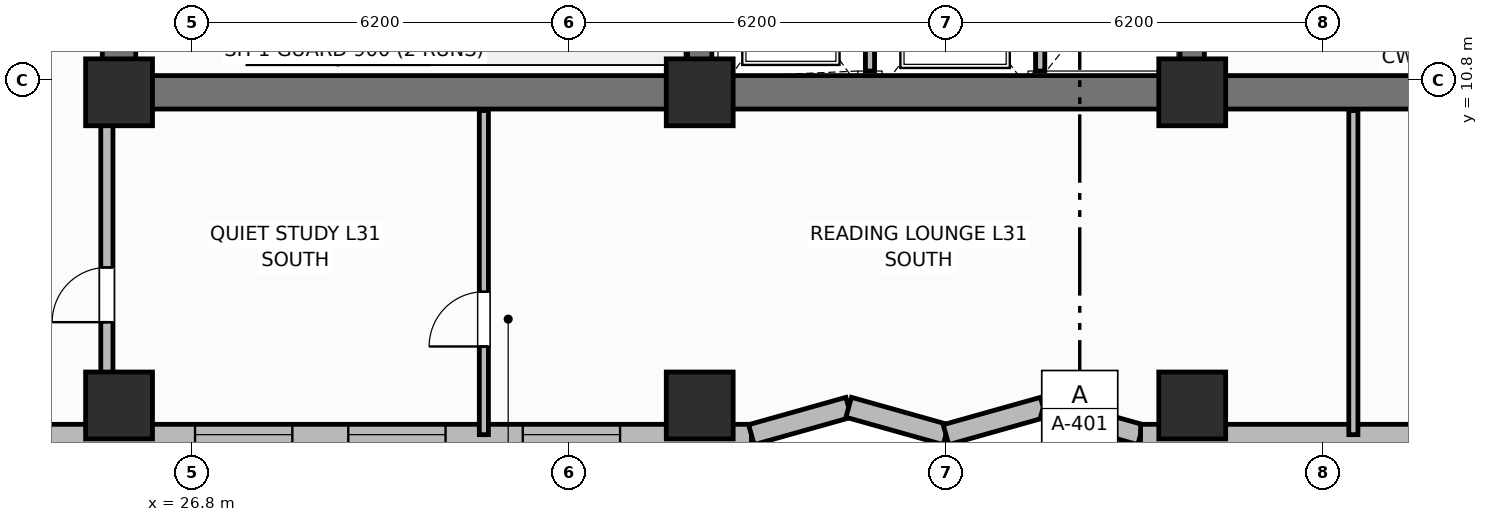
"""IFC4 building model, lengths in metres.
Left out: names, types, materials, properties, quantities, classifications, styles, units other than length and angle.
Written with IfcOpenShell. Run it as: python <this file> out.ifc"""

import sys

from ifc_helpers import new_model, si_unit, direction, frame, frame_2d, origin, origin_2d, place, context, subcontext, project, spatial, rectangle, extrude, element, fill, save


model = new_model("IFC4")
c1 = context("Model", 3, precision=1e-05, world=origin(), true_north=direction((0.0, 1.0)))
c2 = subcontext(c1, "Body", "Model", "MODEL_VIEW")
j1 = project(units=[si_unit("LENGTHUNIT", "METRE"), si_unit("PLANEANGLEUNIT", "RADIAN")], contexts=[c1])
p1 = place(None, origin())
s1 = spatial("IfcSite", under=j1, at=p1, CompositionType="ELEMENT")
p2 = place(p1, origin())
s2 = spatial("IfcBuilding", under=s1, at=p2, CompositionType="ELEMENT")
p3 = place(p2, frame((0.0, 0.0, 125.3)))
s3 = spatial("IfcBuildingStorey", under=s2, at=p3, CompositionType="ELEMENT", Elevation=125.3)
p4 = place(p3, frame((52.8, 10.6, 0.0), z_axis=(0.0, 0.0, 1.0), x_axis=(-1.0, 0.0, 0.0)))
e1 = element("IfcWall", 1, at=p4, inside=s3, PredefinedType="SHEAR", context=c2, shape_type="SweptSolid", body=[
    extrude(rectangle(XDim=27.2, YDim=0.55, at=frame_2d((13.6, 0.0))), origin(), (0.0, 0.0, 1.0), 3.7),
])
p5 = place(p3, frame((25.6, 10.875, 0.0), z_axis=(0.0, 0.0, 1.0), x_axis=(0.0, 1.0, 0.0)))
e2 = element("IfcWall", 2, at=p5, inside=s3, PredefinedType="SHEAR", context=c2, shape_type="SweptSolid", body=[
    extrude(rectangle(XDim=5.65, YDim=0.55, at=frame_2d((2.825, 0.0))), origin(), (0.0, 0.0, 1.0), 3.7),
])
for number, where, z_axis, x_axis in (
    (3, (35.15, 10.875, 0.0), (0.0, 0.0, 1.0), (0.0, 1.0, 0.0)),
    (4, (43.25, 10.875, 0.0), (0.0, 0.0, 1.0), (0.0, 1.0, 0.0)),
):
    element("IfcWall", number, at=place(p3, frame(where, z_axis=z_axis, x_axis=x_axis)), inside=s3, PredefinedType="SHEAR", context=c2, shape_type="SweptSolid", body=[
        extrude(rectangle(XDim=5.65, YDim=0.4, at=frame_2d((2.825, 0.0))), origin(), (0.0, 0.0, 1.0), 3.7),
    ])
for number, where, z_axis, x_axis in (
    (5, (25.6, 10.6, 0.0), (0.0, 0.0, 1.0), (1.0, 0.0, 0.0)),
    (6, (35.15, 10.6, 0.0), (0.0, 0.0, 1.0), (1.0, 0.0, 0.0)),
    (7, (43.25, 10.6, 0.0), (0.0, 0.0, 1.0), (1.0, 0.0, 0.0)),
    (8, (25.6, 5.45, 0.0), (0.0, 0.0, 1.0), (1.0, 0.0, 0.0)),
    (9, (35.15, 5.45, 0.0), (0.0, 0.0, 1.0), (1.0, 0.0, 0.0)),
    (10, (43.25, 5.45, 0.0), (0.0, 0.0, 1.0), (1.0, 0.0, 0.0)),
):
    element("IfcColumn", number, at=place(p3, frame(where, z_axis=z_axis, x_axis=x_axis)), inside=s3, PredefinedType="COLUMN", context=c2, shape_type="SweptSolid", body=[
        extrude(rectangle(XDim=1.1, YDim=1.1, at=origin_2d()), origin(), (0.0, 0.0, 1.0), 3.7),
    ])
p6 = place(p3, frame((18.6, 4.97, 0.0), z_axis=(0.0, 0.0, 1.0), x_axis=(1.0, 0.0, 0.0)))
e11 = element("IfcWall", 11, at=p6, inside=s3, PredefinedType="SOLIDWALL", context=c2, shape_type="SweptSolid", body=[
    extrude(rectangle(XDim=17.4, YDim=0.34, at=frame_2d((8.7, 0.0))), origin(), (0.0, 0.0, 1.0), 2.7),
])
p7 = place(p6, frame((1.46, 0.0, 0.68)))
e12 = element("IfcOpeningElement", 12, at=p7, cuts=e11, PredefinedType="OPENING", context=c2, shape_type="SweptSolid", body=[
    extrude(rectangle(XDim=1.6, YDim=1.9, at=frame_2d((0.8, 0.95))), frame((0.0, 0.18, 0.0), z_axis=(0.0, -1.0, 0.0), x_axis=(1.0, 0.0, 0.0)), (0.0, 0.0, 1.0), 0.36),
])
p8 = place(p6, frame((8.25, 0.0, 0.68)))
e13 = element("IfcOpeningElement", 13, at=p8, cuts=e11, PredefinedType="OPENING", context=c2, shape_type="SweptSolid", body=[
    extrude(rectangle(XDim=1.6, YDim=1.9, at=frame_2d((0.8, 0.95))), frame((0.0, 0.18, 0.0), z_axis=(0.0, -1.0, 0.0), x_axis=(1.0, 0.0, 0.0)), (0.0, 0.0, 1.0), 0.36),
])
p9 = place(p6, frame((10.77, 0.0, 0.68)))
e14 = element("IfcOpeningElement", 14, at=p9, cuts=e11, PredefinedType="OPENING", context=c2, shape_type="SweptSolid", body=[
    extrude(rectangle(XDim=1.6, YDim=1.9, at=frame_2d((0.8, 0.95))), frame((0.0, 0.18, 0.0), z_axis=(0.0, -1.0, 0.0), x_axis=(1.0, 0.0, 0.0)), (0.0, 0.0, 1.0), 0.36),
])
p10 = place(p6, frame((13.64, 0.0, 0.68)))
e15 = element("IfcOpeningElement", 15, at=p10, cuts=e11, PredefinedType="OPENING", context=c2, shape_type="SweptSolid", body=[
    extrude(rectangle(XDim=1.6, YDim=1.9, at=frame_2d((0.8, 0.95))), frame((0.0, 0.18, 0.0), z_axis=(0.0, -1.0, 0.0), x_axis=(1.0, 0.0, 0.0)), (0.0, 0.0, 1.0), 0.36),
])
p11 = place(p3, frame((36.0, 4.97, 0.0), z_axis=(0.0, 0.0, 1.0), x_axis=(0.962662902433, 0.270703040766, 0.0)))
e16 = element("IfcWall", 16, at=p11, inside=s3, PredefinedType="SOLIDWALL", context=c2, shape_type="SweptSolid", body=[
    extrude(rectangle(XDim=1.662, YDim=0.34, at=frame_2d((0.831, 0.0))), origin(), (0.0, 0.0, 1.0), 2.7),
])
p12 = place(p3, frame((37.6, 5.42, 0.0), z_axis=(0.0, 0.0, 1.0), x_axis=(0.962652136636, -0.270741322725, 0.0)))
e17 = element("IfcWall", 17, at=p12, inside=s3, PredefinedType="SOLIDWALL", context=c2, shape_type="SweptSolid", body=[
    extrude(rectangle(XDim=1.662, YDim=0.34, at=frame_2d((0.831, 0.0))), origin(), (0.0, 0.0, 1.0), 2.7),
])
p13 = place(p3, frame((39.2, 4.97, 0.0), z_axis=(0.0, 0.0, 1.0), x_axis=(0.962662902433, 0.270703040766, 0.0)))
e18 = element("IfcWall", 18, at=p13, inside=s3, PredefinedType="SOLIDWALL", context=c2, shape_type="SweptSolid", body=[
    extrude(rectangle(XDim=1.662, YDim=0.34, at=frame_2d((0.831, 0.0))), origin(), (0.0, 0.0, 1.0), 2.7),
])
p14 = place(p3, frame((40.8, 5.42, 0.0), z_axis=(0.0, 0.0, 1.0), x_axis=(0.962652136636, -0.270741322725, 0.0)))
e19 = element("IfcWall", 19, at=p14, inside=s3, PredefinedType="SOLIDWALL", context=c2, shape_type="SweptSolid", body=[
    extrude(rectangle(XDim=1.662, YDim=0.34, at=frame_2d((0.831, 0.0))), origin(), (0.0, 0.0, 1.0), 2.7),
])
p15 = place(p3, frame((42.4, 4.97, 0.0), z_axis=(0.0, 0.0, 1.0), x_axis=(1.0, 0.0, 0.0)))
e20 = element("IfcWall", 20, at=p15, inside=s3, PredefinedType="SOLIDWALL", context=c2, shape_type="SweptSolid", body=[
    extrude(rectangle(XDim=17.4, YDim=0.34, at=frame_2d((8.7, 0.0))), origin(), (0.0, 0.0, 1.0), 2.7),
])
p16 = place(p15, frame((5.887, 0.0, 0.68)))
e21 = element("IfcOpeningElement", 21, at=p16, cuts=e20, PredefinedType="OPENING", context=c2, shape_type="SweptSolid", body=[
    extrude(rectangle(XDim=1.6, YDim=1.9, at=frame_2d((0.8, 0.95))), frame((0.0, 0.18, 0.0), z_axis=(0.0, -1.0, 0.0), x_axis=(1.0, 0.0, 0.0)), (0.0, 0.0, 1.0), 0.36),
])
p17 = place(p15, frame((13.938, 0.0, 0.68)))
e22 = element("IfcOpeningElement", 22, at=p17, cuts=e20, PredefinedType="OPENING", context=c2, shape_type="SweptSolid", body=[
    extrude(rectangle(XDim=1.6, YDim=1.9, at=frame_2d((0.8, 0.95))), frame((0.0, 0.18, 0.0), z_axis=(0.0, -1.0, 0.0), x_axis=(1.0, 0.0, 0.0)), (0.0, 0.0, 1.0), 0.36),
])
for number, where, z_axis, x_axis in (
    (23, (37.95, 10.95, 0.0), (0.0, 0.0, 1.0), (0.0, 1.0, 0.0)),
    (24, (40.75, 10.95, 0.0), (0.0, 0.0, 1.0), (0.0, 1.0, 0.0)),
):
    element("IfcWall", number, at=place(p3, frame(where, z_axis=z_axis, x_axis=x_axis)), inside=s3, PredefinedType="PARTITIONING", context=c2, shape_type="SweptSolid", body=[
        extrude(rectangle(XDim=2.75, YDim=0.15, at=frame_2d((1.375, 0.0))), origin(), (0.0, 0.0, 1.0), 2.53),
    ])
p18 = place(p3, frame((31.6, 4.97, 0.0), z_axis=(0.0, 0.0, 1.0), x_axis=(0.0, 1.0, 0.0)))
e25 = element("IfcWall", 25, at=p18, inside=s3, PredefinedType="PARTITIONING", context=c2, shape_type="SweptSolid", body=[
    extrude(rectangle(XDim=5.33, YDim=0.15, at=frame_2d((2.665, 0.0))), origin(), (0.0, 0.0, 1.0), 2.53),
])
p19 = place(p18, frame((1.45, 0.0, 0.0)))
e26 = element("IfcOpeningElement", 26, at=p19, cuts=e25, PredefinedType="OPENING", context=c2, shape_type="SweptSolid", body=[
    extrude(rectangle(XDim=0.9, YDim=2.1, at=frame_2d((0.45, 1.05))), frame((0.0, 0.085, 0.0), z_axis=(0.0, -1.0, 0.0), x_axis=(1.0, 0.0, 0.0)), (0.0, 0.0, 1.0), 0.17),
])
p20 = place(p3, frame((45.9, 4.97, 0.0), z_axis=(0.0, 0.0, 1.0), x_axis=(0.0, 1.0, 0.0)))
e27 = element("IfcWall", 27, at=p20, inside=s3, PredefinedType="PARTITIONING", context=c2, shape_type="SweptSolid", body=[
    extrude(rectangle(XDim=5.33, YDim=0.15, at=frame_2d((2.665, 0.0))), origin(), (0.0, 0.0, 1.0), 2.53),
])
p21 = place(p3, frame((25.4, 5.77, 0.0), z_axis=(0.0, 0.0, 1.0), x_axis=(0.0, 1.0, 0.0)))
e28 = element("IfcWall", 28, at=p21, inside=s3, PredefinedType="PARTITIONING", context=c2, shape_type="SweptSolid", body=[
    extrude(rectangle(XDim=4.53, YDim=0.2, at=frame_2d((2.265, 0.0))), origin(), (0.0, 0.0, 1.0), 2.53),
])
p22 = place(p21, frame((1.05, 0.0, 0.0)))
e29 = element("IfcOpeningElement", 29, at=p22, cuts=e28, PredefinedType="OPENING", context=c2, shape_type="SweptSolid", body=[
    extrude(rectangle(XDim=0.9, YDim=2.1, at=frame_2d((0.45, 1.05))), frame((0.0, 0.11, 0.0), z_axis=(0.0, -1.0, 0.0), x_axis=(1.0, 0.0, 0.0)), (0.0, 0.0, 1.0), 0.22),
])
p23 = place(p8, origin())
e30 = element("IfcWindow", 30, at=p23, inside=s3, PartitioningType="SINGLE_PANEL", PredefinedType="WINDOW", context=c2, shape_type="SweptSolid", body=[
    extrude(rectangle(XDim=1.6, YDim=1.9, at=frame_2d((0.8, 0.95))), frame((0.0, 0.03, 0.0), z_axis=(0.0, -1.0, 0.0), x_axis=(1.0, 0.0, 0.0)), (0.0, 0.0, 1.0), 0.06),
])
fill(e13, e30)
p24 = place(p9, origin())
e31 = element("IfcWindow", 31, at=p24, inside=s3, PartitioningType="SINGLE_PANEL", PredefinedType="WINDOW", context=c2, shape_type="SweptSolid", body=[
    extrude(rectangle(XDim=1.6, YDim=1.9, at=frame_2d((0.8, 0.95))), frame((0.0, 0.03, 0.0), z_axis=(0.0, -1.0, 0.0), x_axis=(1.0, 0.0, 0.0)), (0.0, 0.0, 1.0), 0.06),
])
fill(e14, e31)
p25 = place(p10, origin())
e32 = element("IfcWindow", 32, at=p25, inside=s3, PartitioningType="SINGLE_PANEL", PredefinedType="WINDOW", context=c2, shape_type="SweptSolid", body=[
    extrude(rectangle(XDim=1.6, YDim=1.9, at=frame_2d((0.8, 0.95))), frame((0.0, 0.03, 0.0), z_axis=(0.0, -1.0, 0.0), x_axis=(1.0, 0.0, 0.0)), (0.0, 0.0, 1.0), 0.06),
])
fill(e15, e32)
p26 = place(p19, origin())
e33 = element("IfcDoor", 33, at=p26, inside=s3, OperationType="SINGLE_SWING_LEFT", PredefinedType="DOOR", context=c2, shape_type="SweptSolid", body=[
    extrude(rectangle(XDim=0.9, YDim=2.1, at=frame_2d((0.45, 1.05))), frame((0.0, 0.025, 0.0), z_axis=(0.0, -1.0, 0.0), x_axis=(1.0, 0.0, 0.0)), (0.0, 0.0, 1.0), 0.05),
])
fill(e26, e33)
p27 = place(p22, origin())
e34 = element("IfcDoor", 34, at=p27, inside=s3, OperationType="SINGLE_SWING_LEFT", PredefinedType="DOOR", context=c2, shape_type="SweptSolid", body=[
    extrude(rectangle(XDim=0.9, YDim=2.1, at=frame_2d((0.45, 1.05))), frame((0.0, 0.025, 0.0), z_axis=(0.0, -1.0, 0.0), x_axis=(1.0, 0.0, 0.0)), (0.0, 0.0, 1.0), 0.05),
])
fill(e29, e34)
save(model, sys.argv[1])
